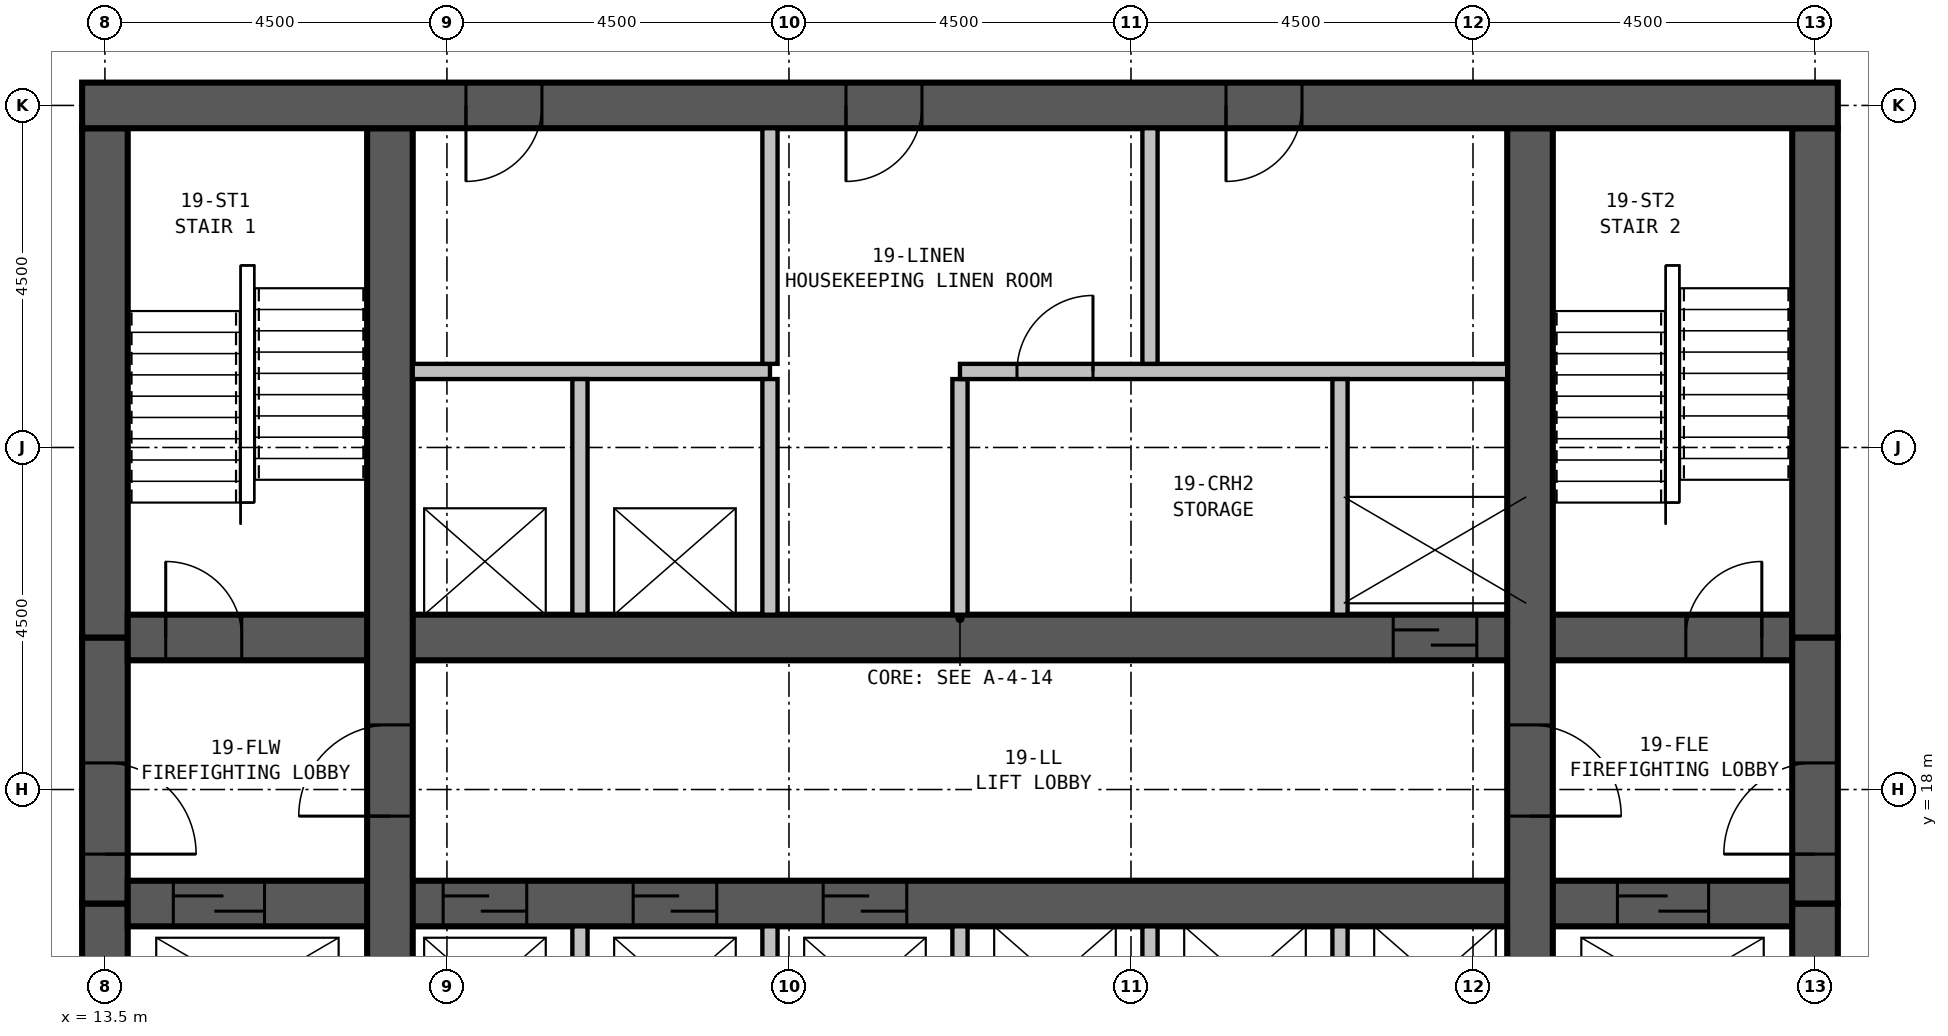
"""IFC4 building model, lengths in metres.
Left out: names, types, materials, properties, quantities, classifications, styles, units other than length and angle.
Written with IfcOpenShell. Run it as: python <this file> out.ifc"""

import sys

from ifc_helpers import new_model, si_unit, direction, frame, frame_2d, origin, place, context, subcontext, project, spatial, rectangle, extrude, element, fill, save


model = new_model("IFC4")
c1 = context("Model", 3, precision=1e-05, world=origin(), true_north=direction((0.0, 1.0)))
c2 = subcontext(c1, "Body", "Model", "MODEL_VIEW")
j1 = project(units=[si_unit("LENGTHUNIT", "METRE"), si_unit("PLANEANGLEUNIT", "RADIAN")], contexts=[c1])
p1 = place(None, origin())
s1 = spatial("IfcSite", under=j1, at=p1, CompositionType="ELEMENT")
p2 = place(p1, origin())
s2 = spatial("IfcBuilding", under=s1, at=p2, CompositionType="ELEMENT")
p3 = place(p2, frame((0.0, 0.0, 78.7)))
s3 = spatial("IfcBuildingStorey", under=s2, at=p3, CompositionType="ELEMENT", Elevation=78.7)
p4 = place(p3, frame((36.3, 27.0, 0.0), z_axis=(0.0, 0.0, 1.0), x_axis=(-1.0, 0.0, 0.0)))
e1 = element("IfcWall", 1, at=p4, inside=s3, PredefinedType="SHEAR", context=c2, shape_type="SweptSolid", body=[
    extrude(rectangle(XDim=23.1, YDim=0.6, at=frame_2d((11.55, 0.0))), origin(), (0.0, 0.0, 1.0), 3.5),
])
p5 = place(p4, frame((17.05, 0.0, 0.0)))
e2 = element("IfcOpeningElement", 2, at=p5, cuts=e1, PredefinedType="OPENING", context=c2, shape_type="SweptSolid", body=[
    extrude(rectangle(XDim=1.0, YDim=2.1, at=frame_2d((0.5, 1.05))), frame((0.0, 0.31, 0.0), z_axis=(0.0, -1.0, 0.0), x_axis=(1.0, 0.0, 0.0)), (0.0, 0.0, 1.0), 0.62),
])
p6 = place(p4, frame((12.05, 0.0, 0.0)))
e3 = element("IfcOpeningElement", 3, at=p6, cuts=e1, PredefinedType="OPENING", context=c2, shape_type="SweptSolid", body=[
    extrude(rectangle(XDim=1.0, YDim=2.1, at=frame_2d((0.5, 1.05))), frame((0.0, 0.31, 0.0), z_axis=(0.0, -1.0, 0.0), x_axis=(1.0, 0.0, 0.0)), (0.0, 0.0, 1.0), 0.62),
])
p7 = place(p4, frame((7.05, 0.0, 0.0)))
e4 = element("IfcOpeningElement", 4, at=p7, cuts=e1, PredefinedType="OPENING", context=c2, shape_type="SweptSolid", body=[
    extrude(rectangle(XDim=1.0, YDim=2.1, at=frame_2d((0.5, 1.05))), frame((0.0, 0.31, 0.0), z_axis=(0.0, -1.0, 0.0), x_axis=(1.0, 0.0, 0.0)), (0.0, 0.0, 1.0), 0.62),
])
p8 = place(p3, frame((17.25, 13.8, 0.0), z_axis=(0.0, 0.0, 1.0), x_axis=(0.0, 1.0, 0.0)))
e5 = element("IfcWall", 5, at=p8, inside=s3, PredefinedType="SHEAR", context=c2, shape_type="SweptSolid", body=[
    extrude(rectangle(XDim=12.9, YDim=0.6, at=frame_2d((6.45, 0.0))), origin(), (0.0, 0.0, 1.0), 3.5),
])
p9 = place(p8, frame((3.85, 0.0, 0.0)))
e6 = element("IfcOpeningElement", 6, at=p9, cuts=e5, PredefinedType="OPENING", context=c2, shape_type="SweptSolid", body=[
    extrude(rectangle(XDim=1.2, YDim=2.1, at=frame_2d((0.6, 1.05))), frame((0.0, 0.31, 0.0), z_axis=(0.0, -1.0, 0.0), x_axis=(1.0, 0.0, 0.0)), (0.0, 0.0, 1.0), 0.62),
])
p10 = place(p3, frame((32.25, 13.8, 0.0), z_axis=(0.0, 0.0, 1.0), x_axis=(0.0, 1.0, 0.0)))
e7 = element("IfcWall", 7, at=p10, inside=s3, PredefinedType="SHEAR", context=c2, shape_type="SweptSolid", body=[
    extrude(rectangle(XDim=12.9, YDim=0.6, at=frame_2d((6.45, 0.0))), origin(), (0.0, 0.0, 1.0), 3.5),
])
p11 = place(p10, frame((5.05, 0.0, 0.0), z_axis=(0.0, 0.0, 1.0), x_axis=(-1.0, 0.0, 0.0)))
e8 = element("IfcOpeningElement", 8, at=p11, cuts=e7, PredefinedType="OPENING", context=c2, shape_type="SweptSolid", body=[
    extrude(rectangle(XDim=1.2, YDim=2.1, at=frame_2d((0.6, 1.05))), frame((0.0, 0.31, 0.0), z_axis=(0.0, -1.0, 0.0), x_axis=(1.0, 0.0, 0.0)), (0.0, 0.0, 1.0), 0.62),
])
p12 = place(p3, frame((13.8, 16.5, 0.0), z_axis=(0.0, 0.0, 1.0), x_axis=(1.0, 0.0, 0.0)))
e9 = element("IfcWall", 9, at=p12, inside=s3, PredefinedType="SHEAR", context=c2, shape_type="SweptSolid", body=[
    extrude(rectangle(XDim=21.9, YDim=0.6, at=frame_2d((10.95, 0.0))), origin(), (0.0, 0.0, 1.0), 3.5),
])
p13 = place(p12, frame((4.15, 0.0, 0.0)))
e10 = element("IfcOpeningElement", 10, at=p13, cuts=e9, PredefinedType="OPENING", context=c2, shape_type="SweptSolid", body=[
    extrude(rectangle(XDim=1.1, YDim=2.1, at=frame_2d((0.55, 1.05))), frame((0.0, 0.31, 0.0), z_axis=(0.0, -1.0, 0.0), x_axis=(1.0, 0.0, 0.0)), (0.0, 0.0, 1.0), 0.62),
])
p14 = place(p12, frame((6.65, 0.0, 0.0)))
e11 = element("IfcOpeningElement", 11, at=p14, cuts=e9, PredefinedType="OPENING", context=c2, shape_type="SweptSolid", body=[
    extrude(rectangle(XDim=1.1, YDim=2.1, at=frame_2d((0.55, 1.05))), frame((0.0, 0.31, 0.0), z_axis=(0.0, -1.0, 0.0), x_axis=(1.0, 0.0, 0.0)), (0.0, 0.0, 1.0), 0.62),
])
p15 = place(p12, frame((9.15, 0.0, 0.0)))
e12 = element("IfcOpeningElement", 12, at=p15, cuts=e9, PredefinedType="OPENING", context=c2, shape_type="SweptSolid", body=[
    extrude(rectangle(XDim=1.1, YDim=2.1, at=frame_2d((0.55, 1.05))), frame((0.0, 0.31, 0.0), z_axis=(0.0, -1.0, 0.0), x_axis=(1.0, 0.0, 0.0)), (0.0, 0.0, 1.0), 0.62),
])
p16 = place(p12, frame((0.6, 0.0, 0.0)))
e13 = element("IfcOpeningElement", 13, at=p16, cuts=e9, PredefinedType="OPENING", context=c2, shape_type="SweptSolid", body=[
    extrude(rectangle(XDim=1.2, YDim=2.1, at=frame_2d((0.6, 1.05))), frame((0.0, 0.31, 0.0), z_axis=(0.0, -1.0, 0.0), x_axis=(1.0, 0.0, 0.0)), (0.0, 0.0, 1.0), 0.62),
])
p17 = place(p12, frame((19.6, 0.0, 0.0)))
e14 = element("IfcOpeningElement", 14, at=p17, cuts=e9, PredefinedType="OPENING", context=c2, shape_type="SweptSolid", body=[
    extrude(rectangle(XDim=1.2, YDim=2.1, at=frame_2d((0.6, 1.05))), frame((0.0, 0.31, 0.0), z_axis=(0.0, -1.0, 0.0), x_axis=(1.0, 0.0, 0.0)), (0.0, 0.0, 1.0), 0.62),
])
p18 = place(p3, frame((13.8, 20.0, 0.0), z_axis=(0.0, 0.0, 1.0), x_axis=(1.0, 0.0, 0.0)))
e15 = element("IfcWall", 15, at=p18, inside=s3, PredefinedType="SHEAR", context=c2, shape_type="SweptSolid", body=[
    extrude(rectangle(XDim=21.9, YDim=0.6, at=frame_2d((10.95, 0.0))), origin(), (0.0, 0.0, 1.0), 3.5),
])
p19 = place(p18, frame((0.5, 0.0, 0.0)))
e16 = element("IfcOpeningElement", 16, at=p19, cuts=e15, PredefinedType="OPENING", context=c2, shape_type="SweptSolid", body=[
    extrude(rectangle(XDim=1.0, YDim=2.1, at=frame_2d((0.5, 1.05))), frame((0.0, 0.31, 0.0), z_axis=(0.0, -1.0, 0.0), x_axis=(1.0, 0.0, 0.0)), (0.0, 0.0, 1.0), 0.62),
])
p20 = place(p18, frame((20.5, 0.0, 0.0)))
e17 = element("IfcOpeningElement", 17, at=p20, cuts=e15, PredefinedType="OPENING", context=c2, shape_type="SweptSolid", body=[
    extrude(rectangle(XDim=1.0, YDim=2.1, at=frame_2d((0.5, 1.05))), frame((0.0, 0.31, 0.0), z_axis=(0.0, -1.0, 0.0), x_axis=(1.0, 0.0, 0.0)), (0.0, 0.0, 1.0), 0.62),
])
p21 = place(p18, frame((16.65, 0.0, 0.0)))
e18 = element("IfcOpeningElement", 18, at=p21, cuts=e15, PredefinedType="OPENING", context=c2, shape_type="SweptSolid", body=[
    extrude(rectangle(XDim=1.1, YDim=2.1, at=frame_2d((0.55, 1.05))), frame((0.0, 0.31, 0.0), z_axis=(0.0, -1.0, 0.0), x_axis=(1.0, 0.0, 0.0)), (0.0, 0.0, 1.0), 0.62),
])
p22 = place(p3, frame((13.5, 26.7, 0.0), z_axis=(0.0, 0.0, 1.0), x_axis=(0.0, -1.0, 0.0)))
e19 = element("IfcWall", 19, at=p22, inside=s3, PredefinedType="SHEAR", context=c2, shape_type="SweptSolid", body=[
    extrude(rectangle(XDim=6.7, YDim=0.6, at=frame_2d((3.35, 0.0))), origin(), (0.0, 0.0, 1.0), 3.5),
])
p23 = place(p3, frame((13.5, 20.0, 0.0), z_axis=(0.0, 0.0, 1.0), x_axis=(0.0, -1.0, 0.0)))
e20 = element("IfcWall", 20, at=p23, inside=s3, PredefinedType="SHEAR", context=c2, shape_type="SweptSolid", body=[
    extrude(rectangle(XDim=3.5, YDim=0.6, at=frame_2d((1.75, 0.0))), origin(), (0.0, 0.0, 1.0), 3.5),
])
p24 = place(p23, frame((1.65, 0.0, 0.0)))
e21 = element("IfcOpeningElement", 21, at=p24, cuts=e20, PredefinedType="OPENING", context=c2, shape_type="SweptSolid", body=[
    extrude(rectangle(XDim=1.2, YDim=2.1, at=frame_2d((0.6, 1.05))), frame((0.0, 0.31, 0.0), z_axis=(0.0, -1.0, 0.0), x_axis=(1.0, 0.0, 0.0)), (0.0, 0.0, 1.0), 0.62),
])
for number, where, z_axis, x_axis in (
    (22, (13.5, 16.5, 0.0), (0.0, 0.0, 1.0), (0.0, -1.0, 0.0)),
    (23, (36.0, 13.8, 0.0), (0.0, 0.0, 1.0), (0.0, 1.0, 0.0)),
):
    element("IfcWall", number, at=place(p3, frame(where, z_axis=z_axis, x_axis=x_axis)), inside=s3, PredefinedType="SHEAR", context=c2, shape_type="SweptSolid", body=[
        extrude(rectangle(XDim=2.7, YDim=0.6, at=frame_2d((1.35, 0.0))), origin(), (0.0, 0.0, 1.0), 3.5),
    ])
p25 = place(p3, frame((36.0, 16.5, 0.0), z_axis=(0.0, 0.0, 1.0), x_axis=(0.0, 1.0, 0.0)))
e24 = element("IfcWall", 24, at=p25, inside=s3, PredefinedType="SHEAR", context=c2, shape_type="SweptSolid", body=[
    extrude(rectangle(XDim=3.5, YDim=0.6, at=frame_2d((1.75, 0.0))), origin(), (0.0, 0.0, 1.0), 3.5),
])
p26 = place(p25, frame((0.65, 0.0, 0.0)))
e25 = element("IfcOpeningElement", 25, at=p26, cuts=e24, PredefinedType="OPENING", context=c2, shape_type="SweptSolid", body=[
    extrude(rectangle(XDim=1.2, YDim=2.1, at=frame_2d((0.6, 1.05))), frame((0.0, 0.31, 0.0), z_axis=(0.0, -1.0, 0.0), x_axis=(1.0, 0.0, 0.0)), (0.0, 0.0, 1.0), 0.62),
])
p27 = place(p3, frame((36.0, 20.0, 0.0), z_axis=(0.0, 0.0, 1.0), x_axis=(0.0, 1.0, 0.0)))
e26 = element("IfcWall", 26, at=p27, inside=s3, PredefinedType="SHEAR", context=c2, shape_type="SweptSolid", body=[
    extrude(rectangle(XDim=6.7, YDim=0.6, at=frame_2d((3.35, 0.0))), origin(), (0.0, 0.0, 1.0), 3.5),
])
p28 = place(p3, frame((19.75, 13.8, 0.0), z_axis=(0.0, 0.0, 1.0), x_axis=(0.0, 1.0, 0.0)))
e27 = element("IfcWall", 27, at=p28, inside=s3, PredefinedType="PARTITIONING", context=c2, shape_type="SweptSolid", body=[
    extrude(rectangle(XDim=2.4, YDim=0.2, at=frame_2d((1.2, 0.0))), origin(), (0.0, 0.0, 1.0), 3.25),
])
p29 = place(p3, frame((19.75, 20.3, 0.0), z_axis=(0.0, 0.0, 1.0), x_axis=(0.0, 1.0, 0.0)))
e28 = element("IfcWall", 28, at=p29, inside=s3, PredefinedType="PARTITIONING", context=c2, shape_type="SweptSolid", body=[
    extrude(rectangle(XDim=3.1, YDim=0.2, at=frame_2d((1.55, 0.0))), origin(), (0.0, 0.0, 1.0), 3.25),
])
p30 = place(p3, frame((22.25, 13.8, 0.0), z_axis=(0.0, 0.0, 1.0), x_axis=(0.0, 1.0, 0.0)))
e29 = element("IfcWall", 29, at=p30, inside=s3, PredefinedType="PARTITIONING", context=c2, shape_type="SweptSolid", body=[
    extrude(rectangle(XDim=2.4, YDim=0.2, at=frame_2d((1.2, 0.0))), origin(), (0.0, 0.0, 1.0), 3.25),
])
p31 = place(p3, frame((22.25, 20.3, 0.0), z_axis=(0.0, 0.0, 1.0), x_axis=(0.0, 1.0, 0.0)))
e30 = element("IfcWall", 30, at=p31, inside=s3, PredefinedType="PARTITIONING", context=c2, shape_type="SweptSolid", body=[
    extrude(rectangle(XDim=3.1, YDim=0.2, at=frame_2d((1.55, 0.0))), origin(), (0.0, 0.0, 1.0), 3.25),
])
p32 = place(p3, frame((24.75, 13.8, 0.0), z_axis=(0.0, 0.0, 1.0), x_axis=(0.0, 1.0, 0.0)))
e31 = element("IfcWall", 31, at=p32, inside=s3, PredefinedType="PARTITIONING", context=c2, shape_type="SweptSolid", body=[
    extrude(rectangle(XDim=2.4, YDim=0.2, at=frame_2d((1.2, 0.0))), origin(), (0.0, 0.0, 1.0), 3.25),
])
p33 = place(p3, frame((24.75, 20.3, 0.0), z_axis=(0.0, 0.0, 1.0), x_axis=(0.0, 1.0, 0.0)))
e32 = element("IfcWall", 32, at=p33, inside=s3, PredefinedType="PARTITIONING", context=c2, shape_type="SweptSolid", body=[
    extrude(rectangle(XDim=3.1, YDim=0.2, at=frame_2d((1.55, 0.0))), origin(), (0.0, 0.0, 1.0), 3.25),
])
for number, where, z_axis, x_axis in (
    (33, (27.25, 13.8, 0.0), (0.0, 0.0, 1.0), (0.0, 1.0, 0.0)),
    (34, (29.75, 13.8, 0.0), (0.0, 0.0, 1.0), (0.0, 1.0, 0.0)),
):
    element("IfcWall", number, at=place(p3, frame(where, z_axis=z_axis, x_axis=x_axis)), inside=s3, PredefinedType="PARTITIONING", context=c2, shape_type="SweptSolid", body=[
        extrude(rectangle(XDim=2.4, YDim=0.2, at=frame_2d((1.2, 0.0))), origin(), (0.0, 0.0, 1.0), 3.25),
    ])
p34 = place(p3, frame((29.75, 20.3, 0.0), z_axis=(0.0, 0.0, 1.0), x_axis=(0.0, 1.0, 0.0)))
e35 = element("IfcWall", 35, at=p34, inside=s3, PredefinedType="PARTITIONING", context=c2, shape_type="SweptSolid", body=[
    extrude(rectangle(XDim=3.1, YDim=0.2, at=frame_2d((1.55, 0.0))), origin(), (0.0, 0.0, 1.0), 3.25),
])
p35 = place(p3, frame((17.55, 23.5, 0.0), z_axis=(0.0, 0.0, 1.0), x_axis=(1.0, 0.0, 0.0)))
e36 = element("IfcWall", 36, at=p35, inside=s3, PredefinedType="PARTITIONING", context=c2, shape_type="SweptSolid", body=[
    extrude(rectangle(XDim=4.7, YDim=0.2, at=frame_2d((2.35, 0.0))), origin(), (0.0, 0.0, 1.0), 3.25),
])
p36 = place(p3, frame((24.75, 23.5, 0.0), z_axis=(0.0, 0.0, 1.0), x_axis=(1.0, 0.0, 0.0)))
e37 = element("IfcWall", 37, at=p36, inside=s3, PredefinedType="PARTITIONING", context=c2, shape_type="SweptSolid", body=[
    extrude(rectangle(XDim=7.2, YDim=0.2, at=frame_2d((3.6, 0.0))), origin(), (0.0, 0.0, 1.0), 3.25),
])
p37 = place(p36, frame((0.75, 0.0, 0.0)))
e38 = element("IfcOpeningElement", 38, at=p37, cuts=e37, PredefinedType="OPENING", context=c2, shape_type="SweptSolid", body=[
    extrude(rectangle(XDim=1.0, YDim=2.1, at=frame_2d((0.5, 1.05))), frame((0.0, 0.11, 0.0), z_axis=(0.0, -1.0, 0.0), x_axis=(1.0, 0.0, 0.0)), (0.0, 0.0, 1.0), 0.22),
])
for number, where, z_axis, x_axis in (
    (39, (22.25, 23.6, 0.0), (0.0, 0.0, 1.0), (0.0, 1.0, 0.0)),
    (40, (27.25, 23.6, 0.0), (0.0, 0.0, 1.0), (0.0, 1.0, 0.0)),
):
    element("IfcWall", number, at=place(p3, frame(where, z_axis=z_axis, x_axis=x_axis)), inside=s3, PredefinedType="PARTITIONING", context=c2, shape_type="SweptSolid", body=[
        extrude(rectangle(XDim=3.1, YDim=0.2, at=frame_2d((1.55, 0.0))), origin(), (0.0, 0.0, 1.0), 3.25),
    ])
p38 = place(p37, origin())
e41 = element("IfcDoor", 41, at=p38, inside=s3, OperationType="SINGLE_SWING_RIGHT", PredefinedType="DOOR", context=c2, shape_type="SweptSolid", body=[
    extrude(rectangle(XDim=1.0, YDim=2.1, at=frame_2d((0.5, 1.05))), frame((0.0, 0.025, 0.0), z_axis=(0.0, -1.0, 0.0), x_axis=(1.0, 0.0, 0.0)), (0.0, 0.0, 1.0), 0.05),
])
fill(e38, e41)
p39 = place(p24, origin())
e42 = element("IfcDoor", 42, at=p39, inside=s3, OperationType="SINGLE_SWING_RIGHT", PredefinedType="DOOR", context=c2, shape_type="SweptSolid", body=[
    extrude(rectangle(XDim=1.2, YDim=2.1, at=frame_2d((0.6, 1.05))), frame((0.0, 0.3, 0.0), z_axis=(0.0, -1.0, 0.0), x_axis=(1.0, 0.0, 0.0)), (0.0, 0.0, 1.0), 0.6),
])
fill(e21, e42)
p40 = place(p26, origin())
e43 = element("IfcDoor", 43, at=p40, inside=s3, OperationType="SINGLE_SWING_LEFT", PredefinedType="DOOR", context=c2, shape_type="SweptSolid", body=[
    extrude(rectangle(XDim=1.2, YDim=2.1, at=frame_2d((0.6, 1.05))), frame((0.0, 0.3, 0.0), z_axis=(0.0, -1.0, 0.0), x_axis=(1.0, 0.0, 0.0)), (0.0, 0.0, 1.0), 0.6),
])
fill(e25, e43)
p41 = place(p9, origin())
e44 = element("IfcDoor", 44, at=p41, inside=s3, OperationType="SINGLE_SWING_LEFT", PredefinedType="DOOR", context=c2, shape_type="SweptSolid", body=[
    extrude(rectangle(XDim=1.2, YDim=2.1, at=frame_2d((0.6, 1.05))), frame((0.0, 0.3, 0.0), z_axis=(0.0, -1.0, 0.0), x_axis=(1.0, 0.0, 0.0)), (0.0, 0.0, 1.0), 0.6),
])
fill(e6, e44)
p42 = place(p11, origin())
e45 = element("IfcDoor", 45, at=p42, inside=s3, OperationType="SINGLE_SWING_RIGHT", PredefinedType="DOOR", context=c2, shape_type="SweptSolid", body=[
    extrude(rectangle(XDim=1.2, YDim=2.1, at=frame_2d((0.6, 1.05))), frame((0.0, 0.3, 0.0), z_axis=(0.0, -1.0, 0.0), x_axis=(1.0, 0.0, 0.0)), (0.0, 0.0, 1.0), 0.6),
])
fill(e8, e45)
p43 = place(p19, origin())
e46 = element("IfcDoor", 46, at=p43, inside=s3, OperationType="SINGLE_SWING_LEFT", PredefinedType="DOOR", context=c2, shape_type="SweptSolid", body=[
    extrude(rectangle(XDim=1.0, YDim=2.1, at=frame_2d((0.5, 1.05))), frame((0.0, 0.3, 0.0), z_axis=(0.0, -1.0, 0.0), x_axis=(1.0, 0.0, 0.0)), (0.0, 0.0, 1.0), 0.6),
])
fill(e16, e46)
p44 = place(p20, origin())
e47 = element("IfcDoor", 47, at=p44, inside=s3, OperationType="SINGLE_SWING_RIGHT", PredefinedType="DOOR", context=c2, shape_type="SweptSolid", body=[
    extrude(rectangle(XDim=1.0, YDim=2.1, at=frame_2d((0.5, 1.05))), frame((0.0, 0.3, 0.0), z_axis=(0.0, -1.0, 0.0), x_axis=(1.0, 0.0, 0.0)), (0.0, 0.0, 1.0), 0.6),
])
fill(e17, e47)
p45 = place(p13, origin())
e48 = element("IfcDoor", 48, at=p45, inside=s3, OperationType="SLIDING_TO_LEFT", PredefinedType="DOOR", context=c2, shape_type="SweptSolid", body=[
    extrude(rectangle(XDim=1.1, YDim=2.1, at=frame_2d((0.55, 1.05))), frame((0.0, 0.3, 0.0), z_axis=(0.0, -1.0, 0.0), x_axis=(1.0, 0.0, 0.0)), (0.0, 0.0, 1.0), 0.6),
])
fill(e10, e48)
p46 = place(p14, origin())
e49 = element("IfcDoor", 49, at=p46, inside=s3, OperationType="SLIDING_TO_LEFT", PredefinedType="DOOR", context=c2, shape_type="SweptSolid", body=[
    extrude(rectangle(XDim=1.1, YDim=2.1, at=frame_2d((0.55, 1.05))), frame((0.0, 0.3, 0.0), z_axis=(0.0, -1.0, 0.0), x_axis=(1.0, 0.0, 0.0)), (0.0, 0.0, 1.0), 0.6),
])
fill(e11, e49)
p47 = place(p15, origin())
e50 = element("IfcDoor", 50, at=p47, inside=s3, OperationType="SLIDING_TO_LEFT", PredefinedType="DOOR", context=c2, shape_type="SweptSolid", body=[
    extrude(rectangle(XDim=1.1, YDim=2.1, at=frame_2d((0.55, 1.05))), frame((0.0, 0.3, 0.0), z_axis=(0.0, -1.0, 0.0), x_axis=(1.0, 0.0, 0.0)), (0.0, 0.0, 1.0), 0.6),
])
fill(e12, e50)
p48 = place(p21, origin())
e51 = element("IfcDoor", 51, at=p48, inside=s3, OperationType="SLIDING_TO_LEFT", PredefinedType="DOOR", context=c2, shape_type="SweptSolid", body=[
    extrude(rectangle(XDim=1.1, YDim=2.1, at=frame_2d((0.55, 1.05))), frame((0.0, 0.3, 0.0), z_axis=(0.0, -1.0, 0.0), x_axis=(1.0, 0.0, 0.0)), (0.0, 0.0, 1.0), 0.6),
])
fill(e18, e51)
p49 = place(p16, origin())
e52 = element("IfcDoor", 52, at=p49, inside=s3, OperationType="SLIDING_TO_LEFT", PredefinedType="DOOR", context=c2, shape_type="SweptSolid", body=[
    extrude(rectangle(XDim=1.2, YDim=2.1, at=frame_2d((0.6, 1.05))), frame((0.0, 0.3, 0.0), z_axis=(0.0, -1.0, 0.0), x_axis=(1.0, 0.0, 0.0)), (0.0, 0.0, 1.0), 0.6),
])
fill(e13, e52)
p50 = place(p17, origin())
e53 = element("IfcDoor", 53, at=p50, inside=s3, OperationType="SLIDING_TO_LEFT", PredefinedType="DOOR", context=c2, shape_type="SweptSolid", body=[
    extrude(rectangle(XDim=1.2, YDim=2.1, at=frame_2d((0.6, 1.05))), frame((0.0, 0.3, 0.0), z_axis=(0.0, -1.0, 0.0), x_axis=(1.0, 0.0, 0.0)), (0.0, 0.0, 1.0), 0.6),
])
fill(e14, e53)
p51 = place(p5, origin())
e54 = element("IfcDoor", 54, at=p51, inside=s3, OperationType="SINGLE_SWING_RIGHT", PredefinedType="DOOR", context=c2, shape_type="SweptSolid", body=[
    extrude(rectangle(XDim=1.0, YDim=2.1, at=frame_2d((0.5, 1.05))), frame((0.0, 0.3, 0.0), z_axis=(0.0, -1.0, 0.0), x_axis=(1.0, 0.0, 0.0)), (0.0, 0.0, 1.0), 0.6),
])
fill(e2, e54)
p52 = place(p6, origin())
e55 = element("IfcDoor", 55, at=p52, inside=s3, OperationType="SINGLE_SWING_RIGHT", PredefinedType="DOOR", context=c2, shape_type="SweptSolid", body=[
    extrude(rectangle(XDim=1.0, YDim=2.1, at=frame_2d((0.5, 1.05))), frame((0.0, 0.3, 0.0), z_axis=(0.0, -1.0, 0.0), x_axis=(1.0, 0.0, 0.0)), (0.0, 0.0, 1.0), 0.6),
])
fill(e3, e55)
p53 = place(p7, origin())
e56 = element("IfcDoor", 56, at=p53, inside=s3, OperationType="SINGLE_SWING_RIGHT", PredefinedType="DOOR", context=c2, shape_type="SweptSolid", body=[
    extrude(rectangle(XDim=1.0, YDim=2.1, at=frame_2d((0.5, 1.05))), frame((0.0, 0.3, 0.0), z_axis=(0.0, -1.0, 0.0), x_axis=(1.0, 0.0, 0.0)), (0.0, 0.0, 1.0), 0.6),
])
fill(e4, e56)
save(model, sys.argv[1])
